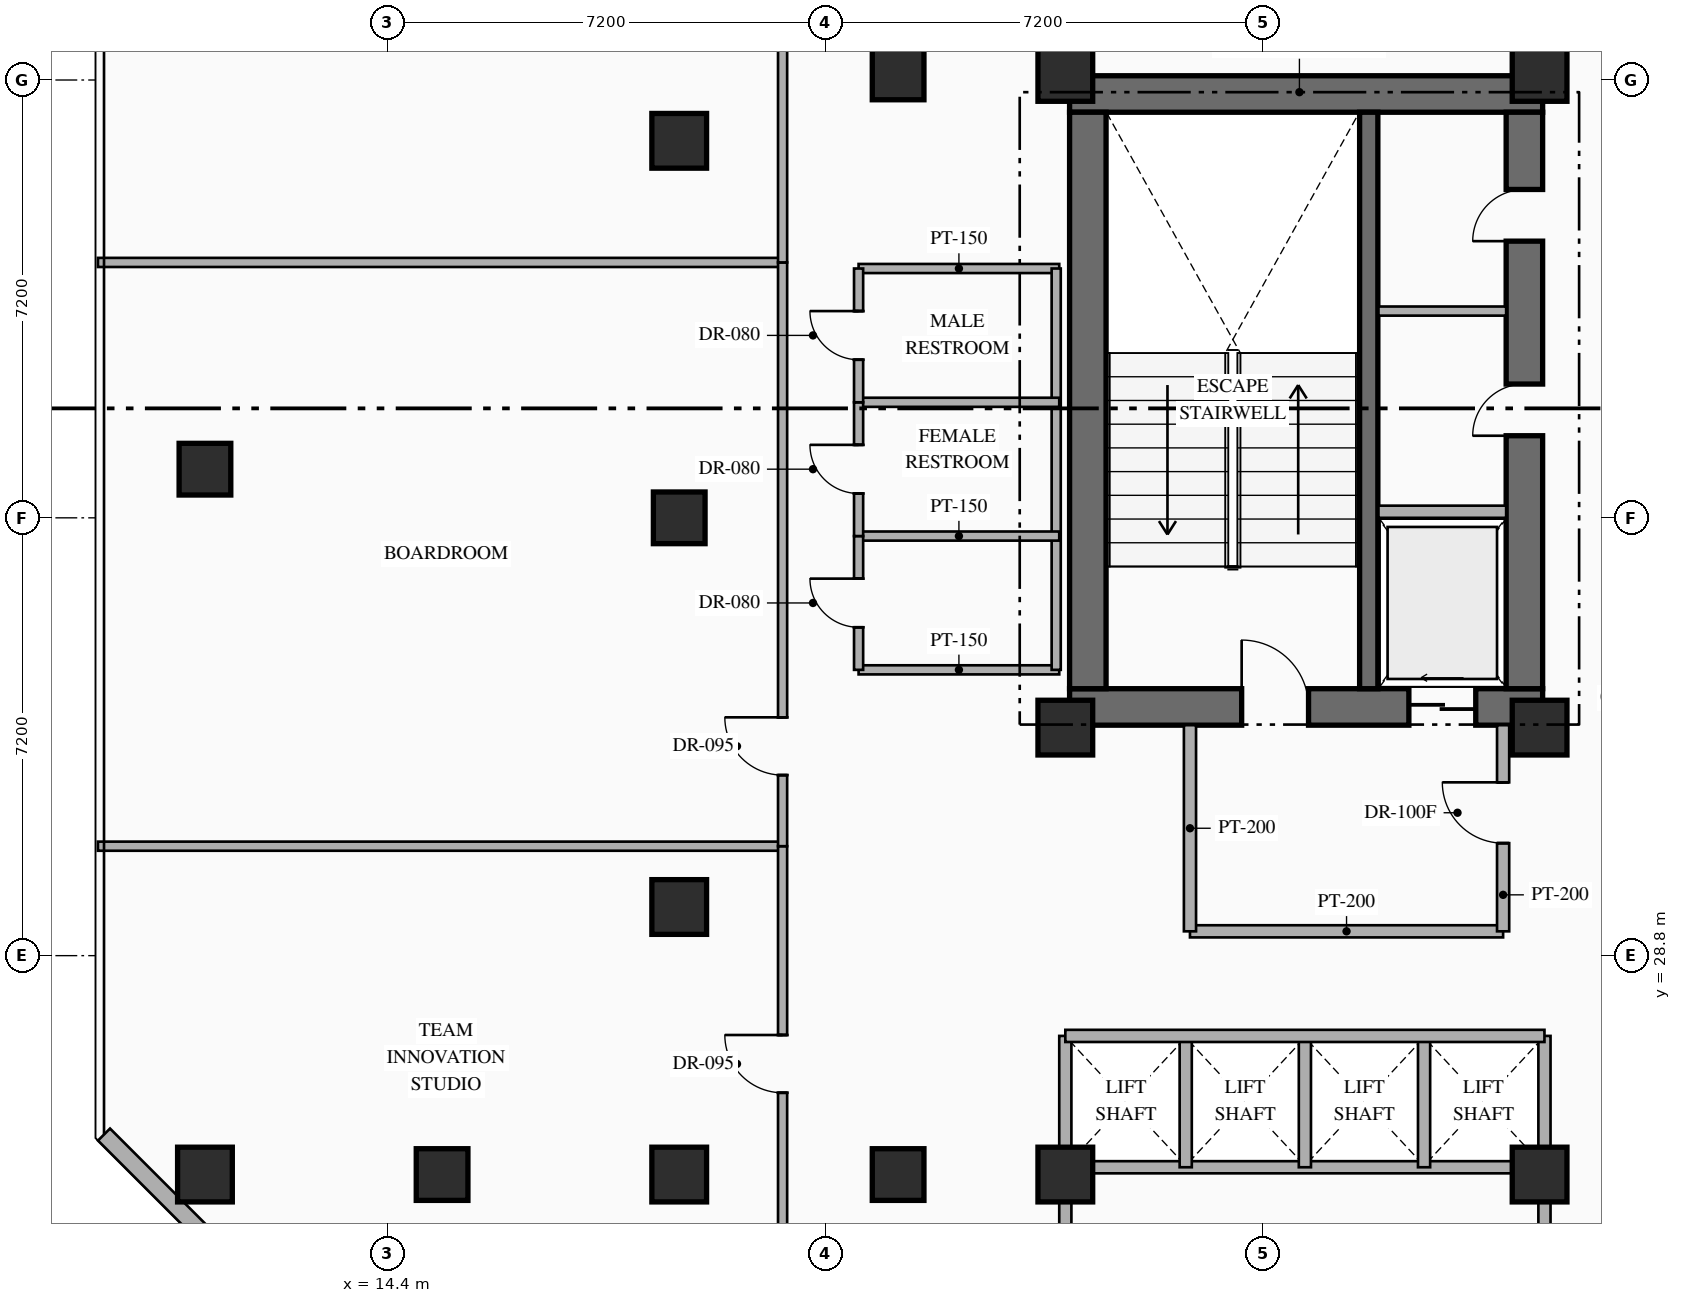
"""IFC4 building model, lengths in metres.
Left out: names, types, materials, properties, quantities, classifications, styles, units other than length and angle.
Written with IfcOpenShell. Run it as: python <this file> out.ifc"""

import sys

from ifc_helpers import new_model, si_unit, direction, frame, frame_2d, origin, origin_2d, place, context, subcontext, project, spatial, rectangle, hollow_rectangle, extrude, element, fill, save


model = new_model("IFC4")
c1 = context("Model", 3, precision=1e-05, world=origin(), true_north=direction((0.0, 1.0)))
c2 = subcontext(c1, "Body", "Model", "MODEL_VIEW")
j1 = project(units=[si_unit("LENGTHUNIT", "METRE"), si_unit("PLANEANGLEUNIT", "RADIAN")], contexts=[c1])
p1 = place(None, origin())
s1 = spatial("IfcSite", under=j1, at=p1, CompositionType="ELEMENT")
p2 = place(p1, origin())
s2 = spatial("IfcBuilding", under=s1, at=p2, CompositionType="ELEMENT")
p3 = place(p2, frame((0.0, 0.0, 101.25)))
s3 = spatial("IfcBuildingStorey", under=s2, at=p3, CompositionType="ELEMENT", Elevation=101.25)
p4 = place(p3, frame((25.62, 32.89, 0.0), z_axis=(0.0, 0.0, 1.0), x_axis=(1.0, 0.0, 0.0)))
e1 = element("IfcWall", 1, at=p4, inside=s3, PredefinedType="SHEAR", context=c2, shape_type="SweptSolid", body=[
    extrude(rectangle(XDim=7.78, YDim=0.6, at=frame_2d((3.89, 0.0))), origin(), (0.0, 0.0, 1.0), 3.6),
])
p5 = place(p4, frame((2.83, 0.0, 0.0)))
e2 = element("IfcOpeningElement", 2, at=p5, cuts=e1, PredefinedType="OPENING", context=c2, shape_type="SweptSolid", body=[
    extrude(rectangle(XDim=1.1, YDim=2.2, at=frame_2d((0.55, 1.1))), frame((0.0, 0.31, 0.0), z_axis=(0.0, -1.0, 0.0), x_axis=(1.0, 0.0, 0.0)), (0.0, 0.0, 1.0), 0.62),
])
p6 = place(p4, frame((5.58, 0.0, 0.0)))
e3 = element("IfcOpeningElement", 3, at=p6, cuts=e1, PredefinedType="OPENING", context=c2, shape_type="SweptSolid", body=[
    extrude(rectangle(XDim=1.1, YDim=2.15, at=frame_2d((0.55, 1.075))), frame((0.0, 0.31, 0.0), z_axis=(0.0, -1.0, 0.0), x_axis=(1.0, 0.0, 0.0)), (0.0, 0.0, 1.0), 0.62),
])
p7 = place(p3, frame((25.62, 42.97, 0.0), z_axis=(0.0, 0.0, 1.0), x_axis=(1.0, 0.0, 0.0)))
e4 = element("IfcWall", 4, at=p7, inside=s3, PredefinedType="SHEAR", context=c2, shape_type="SweptSolid", body=[
    extrude(rectangle(XDim=7.78, YDim=0.6, at=frame_2d((3.89, 0.0))), origin(), (0.0, 0.0, 1.0), 3.6),
])
p8 = place(p3, frame((25.92, 33.19, 0.0), z_axis=(0.0, 0.0, 1.0), x_axis=(0.0, 1.0, 0.0)))
e5 = element("IfcWall", 5, at=p8, inside=s3, PredefinedType="SHEAR", context=c2, shape_type="SweptSolid", body=[
    extrude(rectangle(XDim=9.48, YDim=0.6, at=frame_2d((4.74, 0.0))), origin(), (0.0, 0.0, 1.0), 3.6),
])
p9 = place(p3, frame((33.1, 33.19, 0.0), z_axis=(0.0, 0.0, 1.0), x_axis=(0.0, 1.0, 0.0)))
e6 = element("IfcWall", 6, at=p9, inside=s3, PredefinedType="SHEAR", context=c2, shape_type="SweptSolid", body=[
    extrude(rectangle(XDim=9.48, YDim=0.6, at=frame_2d((4.74, 0.0))), origin(), (0.0, 0.0, 1.0), 3.6),
])
p10 = place(p9, frame((4.16, 0.0, 0.0)))
e7 = element("IfcOpeningElement", 7, at=p10, cuts=e6, PredefinedType="OPENING", context=c2, shape_type="SweptSolid", body=[
    extrude(rectangle(XDim=0.85, YDim=2.08, at=frame_2d((0.425, 1.04))), frame((0.0, 0.31, 0.0), z_axis=(0.0, -1.0, 0.0), x_axis=(1.0, 0.0, 0.0)), (0.0, 0.0, 1.0), 0.62),
])
p11 = place(p9, frame((7.36, 0.0, 0.0)))
e8 = element("IfcOpeningElement", 8, at=p11, cuts=e6, PredefinedType="OPENING", context=c2, shape_type="SweptSolid", body=[
    extrude(rectangle(XDim=0.85, YDim=2.08, at=frame_2d((0.425, 1.04))), frame((0.0, 0.31, 0.0), z_axis=(0.0, -1.0, 0.0), x_axis=(1.0, 0.0, 0.0)), (0.0, 0.0, 1.0), 0.62),
])
p12 = place(p3, frame((30.54, 33.19, 0.0), z_axis=(0.0, 0.0, 1.0), x_axis=(0.0, 1.0, 0.0)))
e9 = element("IfcWall", 9, at=p12, inside=s3, PredefinedType="SHEAR", context=c2, shape_type="SweptSolid", body=[
    extrude(rectangle(XDim=9.48, YDim=0.3, at=frame_2d((4.74, 0.0))), origin(), (0.0, 0.0, 1.0), 3.6),
])
for number, where, z_axis, x_axis in (
    (10, (25.55, 32.55, 0.0), (0.0, 0.0, 1.0), (1.0, 0.0, 0.0)),
    (11, (33.35, 32.55, 0.0), (0.0, 0.0, 1.0), (1.0, 0.0, 0.0)),
    (12, (25.55, 43.3, 0.0), (0.0, 0.0, 1.0), (1.0, 0.0, 0.0)),
    (13, (33.35, 43.3, 0.0), (0.0, 0.0, 1.0), (1.0, 0.0, 0.0)),
):
    element("IfcColumn", number, at=place(p3, frame(where, z_axis=z_axis, x_axis=x_axis)), inside=s3, PredefinedType="COLUMN", context=c2, shape_type="SweptSolid", body=[
        extrude(rectangle(XDim=0.9, YDim=0.9, at=origin_2d()), origin(), (0.0, 0.0, 1.0), 3.6),
    ])
for number, where, z_axis, x_axis in (
    (14, (25.55, 25.2, 0.0), (0.0, 0.0, 1.0), (1.0, 0.0, 0.0)),
    (15, (33.35, 25.2, 0.0), (0.0, 0.0, 1.0), (1.0, 0.0, 0.0)),
    (16, (11.4, 25.2, 0.0), (0.0, 0.0, 1.0), (1.0, 0.0, 0.0)),
    (17, (19.2, 25.2, 0.0), (0.0, 0.0, 1.0), (1.0, 0.0, 0.0)),
    (18, (19.2, 29.6, 0.0), (0.0, 0.0, 1.0), (1.0, 0.0, 0.0)),
    (19, (19.2, 42.2, 0.0), (0.0, 0.0, 1.0), (1.0, 0.0, 0.0)),
):
    element("IfcColumn", number, at=place(p3, frame(where, z_axis=z_axis, x_axis=x_axis)), inside=s3, PredefinedType="COLUMN", context=c2, shape_type="SweptSolid", body=[
        extrude(hollow_rectangle(XDim=0.9, YDim=0.9, WallThickness=0.036, at=origin_2d()), origin(), (0.0, 0.0, 1.0), 3.6),
    ])
for number, where, z_axis, x_axis in (
    (20, (22.8, 25.2, 0.0), (0.0, 0.0, 1.0), (1.0, 0.0, 0.0)),
    (21, (22.8, 43.3, 0.0), (0.0, 0.0, 1.0), (1.0, 0.0, 0.0)),
    (22, (11.4, 36.8, 0.0), (0.0, 0.0, 1.0), (1.0, 0.0, 0.0)),
    (23, (19.2, 36.0, 0.0), (0.0, 0.0, 1.0), (1.0, 0.0, 0.0)),
    (24, (15.3, 25.2, 0.0), (0.0, 0.0, 1.0), (1.0, 0.0, 0.0)),
):
    element("IfcColumn", number, at=place(p3, frame(where, z_axis=z_axis, x_axis=x_axis)), inside=s3, PredefinedType="COLUMN", context=c2, shape_type="SweptSolid", body=[
        extrude(hollow_rectangle(XDim=0.85, YDim=0.85, WallThickness=0.032, at=origin_2d()), origin(), (0.0, 0.0, 1.0), 3.6),
    ])
p13 = place(p3, frame((12.058, 23.54, 0.0), z_axis=(0.0, 0.0, 1.0), x_axis=(-0.707144017911, 0.707069542501, 0.0)))
e25 = element("IfcWall", 25, at=p13, inside=s3, PredefinedType="STANDARD", context=c2, shape_type="SweptSolid", body=[
    extrude(rectangle(XDim=3.278, YDim=0.28, at=frame_2d((1.639, 0.0))), origin(), (0.0, 0.0, 1.0), 3.35),
])
p14 = place(p3, frame((30.7, 36.1, 0.0), z_axis=(0.0, 0.0, 1.0), x_axis=(1.0, 0.0, 0.0)))
e26 = element("IfcWall", 26, at=p14, inside=s3, PredefinedType="STANDARD", context=c2, shape_type="SweptSolid", body=[
    extrude(rectangle(XDim=2.1, YDim=0.2, at=frame_2d((1.05, 0.0))), origin(), (0.0, 0.0, 1.0), 3.35),
])
p15 = place(p3, frame((30.7, 39.4, 0.0), z_axis=(0.0, 0.0, 1.0), x_axis=(1.0, 0.0, 0.0)))
e27 = element("IfcWall", 27, at=p15, inside=s3, PredefinedType="PARTITIONING", context=c2, shape_type="SweptSolid", body=[
    extrude(rectangle(XDim=2.1, YDim=0.15, at=frame_2d((1.05, 0.0))), origin(), (0.0, 0.0, 1.0), 3.35),
])
p16 = place(p3, frame((27.6, 29.2, 0.0), z_axis=(0.0, 0.0, 1.0), x_axis=(1.0, 0.0, 0.0)))
e28 = element("IfcWall", 28, at=p16, inside=s3, PredefinedType="STANDARD", context=c2, shape_type="SweptSolid", body=[
    extrude(rectangle(XDim=5.15, YDim=0.2, at=frame_2d((2.575, 0.0))), origin(), (0.0, 0.0, 1.0), 3.35),
])
p17 = place(p3, frame((27.6, 29.2, 0.0), z_axis=(0.0, 0.0, 1.0), x_axis=(0.0, 1.0, 0.0)))
e29 = element("IfcWall", 29, at=p17, inside=s3, PredefinedType="STANDARD", context=c2, shape_type="SweptSolid", body=[
    extrude(rectangle(XDim=3.39, YDim=0.2, at=frame_2d((1.695, 0.0))), origin(), (0.0, 0.0, 1.0), 3.35),
])
p18 = place(p3, frame((32.75, 29.2, 0.0), z_axis=(0.0, 0.0, 1.0), x_axis=(0.0, 1.0, 0.0)))
e30 = element("IfcWall", 30, at=p18, inside=s3, PredefinedType="STANDARD", context=c2, shape_type="SweptSolid", body=[
    extrude(rectangle(XDim=3.39, YDim=0.2, at=frame_2d((1.695, 0.0))), origin(), (0.0, 0.0, 1.0), 3.35),
])
p19 = place(p18, frame((1.45, 0.0, 0.0)))
e31 = element("IfcOpeningElement", 31, at=p19, cuts=e30, PredefinedType="OPENING", context=c2, shape_type="SweptSolid", body=[
    extrude(rectangle(XDim=1.0, YDim=2.2, at=frame_2d((0.5, 1.1))), frame((0.0, 0.11, 0.0), z_axis=(0.0, -1.0, 0.0), x_axis=(1.0, 0.0, 0.0)), (0.0, 0.0, 1.0), 0.22),
])
for number, where, z_axis, x_axis in (
    (32, (25.55, 23.4, 0.0), (0.0, 0.0, 1.0), (0.0, 1.0, 0.0)),
    (33, (33.43, 23.4, 0.0), (0.0, 0.0, 1.0), (0.0, 1.0, 0.0)),
):
    element("IfcWall", number, at=place(p3, frame(where, z_axis=z_axis, x_axis=x_axis)), inside=s3, PredefinedType="STANDARD", context=c2, shape_type="SweptSolid", body=[
        extrude(rectangle(XDim=4.08, YDim=0.2, at=frame_2d((2.04, 0.0))), origin(), (0.0, 0.0, 1.0), 2.695),
    ])
p20 = place(p3, frame((25.55, 25.32, 0.0), z_axis=(0.0, 0.0, 1.0), x_axis=(1.0, 0.0, 0.0)))
e34 = element("IfcWall", 34, at=p20, inside=s3, PredefinedType="STANDARD", context=c2, shape_type="SweptSolid", body=[
    extrude(rectangle(XDim=7.88, YDim=0.2, at=frame_2d((3.94, 0.0))), origin(), (0.0, 0.0, 1.0), 2.745),
])
for number, where, z_axis, x_axis in (
    (35, (27.53, 25.32, 0.0), (0.0, 0.0, 1.0), (0.0, 1.0, 0.0)),
    (36, (29.49, 25.32, 0.0), (0.0, 0.0, 1.0), (0.0, 1.0, 0.0)),
    (37, (31.45, 25.32, 0.0), (0.0, 0.0, 1.0), (0.0, 1.0, 0.0)),
):
    element("IfcWall", number, at=place(p3, frame(where, z_axis=z_axis, x_axis=x_axis)), inside=s3, PredefinedType="STANDARD", context=c2, shape_type="SweptSolid", body=[
        extrude(rectangle(XDim=2.16, YDim=0.2, at=frame_2d((1.08, 0.0))), origin(), (0.0, 0.0, 1.0), 3.35),
    ])
p21 = place(p3, frame((25.55, 27.48, 0.0), z_axis=(0.0, 0.0, 1.0), x_axis=(1.0, 0.0, 0.0)))
e38 = element("IfcWall", 38, at=p21, inside=s3, PredefinedType="STANDARD", context=c2, shape_type="SweptSolid", body=[
    extrude(rectangle(XDim=7.88, YDim=0.2, at=frame_2d((3.94, 0.0))), origin(), (0.0, 0.0, 1.0), 3.35),
])
for number, where, z_axis, x_axis in (
    (39, (22.15, 33.5, 0.0), (0.0, 0.0, 1.0), (1.0, 0.0, 0.0)),
    (40, (22.15, 40.1, 0.0), (0.0, 0.0, 1.0), (1.0, 0.0, 0.0)),
):
    element("IfcWall", number, at=place(p3, frame(where, z_axis=z_axis, x_axis=x_axis)), inside=s3, PredefinedType="PARTITIONING", context=c2, shape_type="SweptSolid", body=[
        extrude(rectangle(XDim=3.3, YDim=0.15, at=frame_2d((1.65, 0.0))), origin(), (0.0, 0.0, 1.0), 3.35),
    ])
p22 = place(p3, frame((25.4, 33.5, 0.0), z_axis=(0.0, 0.0, 1.0), x_axis=(0.0, 1.0, 0.0)))
e41 = element("IfcWall", 41, at=p22, inside=s3, PredefinedType="PARTITIONING", context=c2, shape_type="SweptSolid", body=[
    extrude(rectangle(XDim=6.6, YDim=0.15, at=frame_2d((3.3, 0.0))), origin(), (0.0, 0.0, 1.0), 3.35),
])
for number, where, z_axis, x_axis in (
    (42, (22.15, 35.7, 0.0), (0.0, 0.0, 1.0), (1.0, 0.0, 0.0)),
    (43, (22.15, 37.9, 0.0), (0.0, 0.0, 1.0), (1.0, 0.0, 0.0)),
):
    element("IfcWall", number, at=place(p3, frame(where, z_axis=z_axis, x_axis=x_axis)), inside=s3, PredefinedType="PARTITIONING", context=c2, shape_type="SweptSolid", body=[
        extrude(rectangle(XDim=3.3, YDim=0.15, at=frame_2d((1.65, 0.0))), origin(), (0.0, 0.0, 1.0), 3.35),
    ])
p23 = place(p3, frame((22.15, 33.5, 0.0), z_axis=(0.0, 0.0, 1.0), x_axis=(0.0, 1.0, 0.0)))
e44 = element("IfcWall", 44, at=p23, inside=s3, PredefinedType="PARTITIONING", context=c2, shape_type="SweptSolid", body=[
    extrude(rectangle(XDim=2.2, YDim=0.15, at=frame_2d((1.1, 0.0))), origin(), (0.0, 0.0, 1.0), 3.35),
])
p24 = place(p23, frame((0.7, 0.0, 0.0)))
e45 = element("IfcOpeningElement", 45, at=p24, cuts=e44, PredefinedType="OPENING", context=c2, shape_type="SweptSolid", body=[
    extrude(rectangle(XDim=0.8, YDim=2.06, at=frame_2d((0.4, 1.03))), frame((0.0, 0.085, 0.0), z_axis=(0.0, -1.0, 0.0), x_axis=(1.0, 0.0, 0.0)), (0.0, 0.0, 1.0), 0.17),
])
p25 = place(p3, frame((22.15, 35.7, 0.0), z_axis=(0.0, 0.0, 1.0), x_axis=(0.0, 1.0, 0.0)))
e46 = element("IfcWall", 46, at=p25, inside=s3, PredefinedType="PARTITIONING", context=c2, shape_type="SweptSolid", body=[
    extrude(rectangle(XDim=2.2, YDim=0.15, at=frame_2d((1.1, 0.0))), origin(), (0.0, 0.0, 1.0), 3.35),
])
p26 = place(p25, frame((0.7, 0.0, 0.0)))
e47 = element("IfcOpeningElement", 47, at=p26, cuts=e46, PredefinedType="OPENING", context=c2, shape_type="SweptSolid", body=[
    extrude(rectangle(XDim=0.8, YDim=2.06, at=frame_2d((0.4, 1.03))), frame((0.0, 0.085, 0.0), z_axis=(0.0, -1.0, 0.0), x_axis=(1.0, 0.0, 0.0)), (0.0, 0.0, 1.0), 0.17),
])
p27 = place(p3, frame((22.15, 37.9, 0.0), z_axis=(0.0, 0.0, 1.0), x_axis=(0.0, 1.0, 0.0)))
e48 = element("IfcWall", 48, at=p27, inside=s3, PredefinedType="PARTITIONING", context=c2, shape_type="SweptSolid", body=[
    extrude(rectangle(XDim=2.2, YDim=0.15, at=frame_2d((1.1, 0.0))), origin(), (0.0, 0.0, 1.0), 3.35),
])
p28 = place(p27, frame((0.7, 0.0, 0.0)))
e49 = element("IfcOpeningElement", 49, at=p28, cuts=e48, PredefinedType="OPENING", context=c2, shape_type="SweptSolid", body=[
    extrude(rectangle(XDim=0.8, YDim=2.06, at=frame_2d((0.4, 1.03))), frame((0.0, 0.085, 0.0), z_axis=(0.0, -1.0, 0.0), x_axis=(1.0, 0.0, 0.0)), (0.0, 0.0, 1.0), 0.17),
])
p29 = place(p3, frame((9.64, 30.6, 0.0), z_axis=(0.0, 0.0, 1.0), x_axis=(1.0, 0.0, 0.0)))
e50 = element("IfcWall", 50, at=p29, inside=s3, PredefinedType="PARTITIONING", context=c2, shape_type="SweptSolid", body=[
    extrude(rectangle(XDim=11.26, YDim=0.15, at=frame_2d((5.63, 0.0))), origin(), (0.0, 0.0, 1.0), 3.35),
])
p30 = place(p3, frame((20.9, 23.44, 0.0), z_axis=(0.0, 0.0, 1.0), x_axis=(0.0, 1.0, 0.0)))
e51 = element("IfcWall", 51, at=p30, inside=s3, PredefinedType="PARTITIONING", context=c2, shape_type="SweptSolid", body=[
    extrude(rectangle(XDim=7.16, YDim=0.15, at=frame_2d((3.58, 0.0))), origin(), (0.0, 0.0, 1.0), 3.35),
])
p31 = place(p30, frame((3.105, 0.0, 0.0)))
e52 = element("IfcOpeningElement", 52, at=p31, cuts=e51, PredefinedType="OPENING", context=c2, shape_type="SweptSolid", body=[
    extrude(rectangle(XDim=0.95, YDim=2.15, at=frame_2d((0.475, 1.075))), frame((0.0, 0.085, 0.0), z_axis=(0.0, -1.0, 0.0), x_axis=(1.0, 0.0, 0.0)), (0.0, 0.0, 1.0), 0.17),
])
p32 = place(p3, frame((9.64, 40.2, 0.0), z_axis=(0.0, 0.0, 1.0), x_axis=(1.0, 0.0, 0.0)))
e53 = element("IfcWall", 53, at=p32, inside=s3, PredefinedType="PARTITIONING", context=c2, shape_type="SweptSolid", body=[
    extrude(rectangle(XDim=11.26, YDim=0.15, at=frame_2d((5.63, 0.0))), origin(), (0.0, 0.0, 1.0), 3.35),
])
p33 = place(p3, frame((20.9, 30.6, 0.0), z_axis=(0.0, 0.0, 1.0), x_axis=(0.0, 1.0, 0.0)))
e54 = element("IfcWall", 54, at=p33, inside=s3, PredefinedType="PARTITIONING", context=c2, shape_type="SweptSolid", body=[
    extrude(rectangle(XDim=9.6, YDim=0.15, at=frame_2d((4.8, 0.0))), origin(), (0.0, 0.0, 1.0), 3.35),
])
p34 = place(p33, frame((1.169, 0.0, 0.0)))
e55 = element("IfcOpeningElement", 55, at=p34, cuts=e54, PredefinedType="OPENING", context=c2, shape_type="SweptSolid", body=[
    extrude(rectangle(XDim=0.95, YDim=2.15, at=frame_2d((0.475, 1.075))), frame((0.0, 0.085, 0.0), z_axis=(0.0, -1.0, 0.0), x_axis=(1.0, 0.0, 0.0)), (0.0, 0.0, 1.0), 0.17),
])
p35 = place(p3, frame((20.9, 40.2, 0.0), z_axis=(0.0, 0.0, 1.0), x_axis=(0.0, 1.0, 0.0)))
e56 = element("IfcWall", 56, at=p35, inside=s3, PredefinedType="PARTITIONING", context=c2, shape_type="SweptSolid", body=[
    extrude(rectangle(XDim=10.16, YDim=0.15, at=frame_2d((5.08, 0.0))), origin(), (0.0, 0.0, 1.0), 3.35),
])
p36 = place(p35, frame((3.76, 0.0, 0.0)))
e57 = element("IfcOpeningElement", 57, at=p36, cuts=e56, PredefinedType="OPENING", context=c2, shape_type="SweptSolid", body=[
    extrude(rectangle(XDim=0.95, YDim=2.15, at=frame_2d((0.475, 1.075))), frame((0.0, 0.085, 0.0), z_axis=(0.0, -1.0, 0.0), x_axis=(1.0, 0.0, 0.0)), (0.0, 0.0, 1.0), 0.17),
])
p37 = place(p5, origin())
e58 = element("IfcDoor", 58, at=p37, inside=s3, OperationType="SINGLE_SWING_LEFT", PredefinedType="DOOR", context=c2, shape_type="SweptSolid", body=[
    extrude(rectangle(XDim=1.1, YDim=2.2, at=frame_2d((0.55, 1.1))), frame((0.0, 0.025, 0.0), z_axis=(0.0, -1.0, 0.0), x_axis=(1.0, 0.0, 0.0)), (0.0, 0.0, 1.0), 0.05),
])
fill(e2, e58)
p38 = place(p6, origin())
e59 = element("IfcDoor", 59, at=p38, inside=s3, OperationType="SLIDING_TO_LEFT", PredefinedType="USERDEFINED", context=c2, shape_type="SweptSolid", body=[
    extrude(rectangle(XDim=1.1, YDim=2.15, at=frame_2d((0.55, 1.075))), frame((0.0, 0.025, 0.0), z_axis=(0.0, -1.0, 0.0), x_axis=(1.0, 0.0, 0.0)), (0.0, 0.0, 1.0), 0.05),
])
fill(e3, e59)
p39 = place(p10, origin())
e60 = element("IfcDoor", 60, at=p39, inside=s3, OperationType="SINGLE_SWING_LEFT", PredefinedType="DOOR", context=c2, shape_type="SweptSolid", body=[
    extrude(rectangle(XDim=0.85, YDim=2.08, at=frame_2d((0.425, 1.04))), frame((0.0, 0.025, 0.0), z_axis=(0.0, -1.0, 0.0), x_axis=(1.0, 0.0, 0.0)), (0.0, 0.0, 1.0), 0.05),
])
fill(e7, e60)
p40 = place(p11, origin())
e61 = element("IfcDoor", 61, at=p40, inside=s3, OperationType="SINGLE_SWING_LEFT", PredefinedType="DOOR", context=c2, shape_type="SweptSolid", body=[
    extrude(rectangle(XDim=0.85, YDim=2.08, at=frame_2d((0.425, 1.04))), frame((0.0, 0.025, 0.0), z_axis=(0.0, -1.0, 0.0), x_axis=(1.0, 0.0, 0.0)), (0.0, 0.0, 1.0), 0.05),
])
fill(e8, e61)
p41 = place(p19, origin())
e62 = element("IfcDoor", 62, at=p41, inside=s3, OperationType="SINGLE_SWING_RIGHT", PredefinedType="DOOR", context=c2, shape_type="SweptSolid", body=[
    extrude(rectangle(XDim=1.0, YDim=2.2, at=frame_2d((0.5, 1.1))), frame((0.0, 0.025, 0.0), z_axis=(0.0, -1.0, 0.0), x_axis=(1.0, 0.0, 0.0)), (0.0, 0.0, 1.0), 0.05),
])
fill(e31, e62)
p42 = place(p24, origin())
e63 = element("IfcDoor", 63, at=p42, inside=s3, OperationType="SINGLE_SWING_RIGHT", PredefinedType="DOOR", context=c2, shape_type="SweptSolid", body=[
    extrude(rectangle(XDim=0.8, YDim=2.06, at=frame_2d((0.4, 1.03))), frame((0.0, 0.025, 0.0), z_axis=(0.0, -1.0, 0.0), x_axis=(1.0, 0.0, 0.0)), (0.0, 0.0, 1.0), 0.05),
])
fill(e45, e63)
p43 = place(p26, origin())
e64 = element("IfcDoor", 64, at=p43, inside=s3, OperationType="SINGLE_SWING_RIGHT", PredefinedType="DOOR", context=c2, shape_type="SweptSolid", body=[
    extrude(rectangle(XDim=0.8, YDim=2.06, at=frame_2d((0.4, 1.03))), frame((0.0, 0.025, 0.0), z_axis=(0.0, -1.0, 0.0), x_axis=(1.0, 0.0, 0.0)), (0.0, 0.0, 1.0), 0.05),
])
fill(e47, e64)
p44 = place(p28, origin())
e65 = element("IfcDoor", 65, at=p44, inside=s3, OperationType="SINGLE_SWING_RIGHT", PredefinedType="DOOR", context=c2, shape_type="SweptSolid", body=[
    extrude(rectangle(XDim=0.8, YDim=2.06, at=frame_2d((0.4, 1.03))), frame((0.0, 0.025, 0.0), z_axis=(0.0, -1.0, 0.0), x_axis=(1.0, 0.0, 0.0)), (0.0, 0.0, 1.0), 0.05),
])
fill(e49, e65)
p45 = place(p31, origin())
e66 = element("IfcDoor", 66, at=p45, inside=s3, OperationType="SINGLE_SWING_RIGHT", PredefinedType="DOOR", context=c2, shape_type="SweptSolid", body=[
    extrude(rectangle(XDim=0.95, YDim=2.15, at=frame_2d((0.475, 1.075))), frame((0.0, 0.025, 0.0), z_axis=(0.0, -1.0, 0.0), x_axis=(1.0, 0.0, 0.0)), (0.0, 0.0, 1.0), 0.05),
])
fill(e52, e66)
p46 = place(p34, origin())
e67 = element("IfcDoor", 67, at=p46, inside=s3, OperationType="SINGLE_SWING_RIGHT", PredefinedType="DOOR", context=c2, shape_type="SweptSolid", body=[
    extrude(rectangle(XDim=0.95, YDim=2.15, at=frame_2d((0.475, 1.075))), frame((0.0, 0.025, 0.0), z_axis=(0.0, -1.0, 0.0), x_axis=(1.0, 0.0, 0.0)), (0.0, 0.0, 1.0), 0.05),
])
fill(e55, e67)
save(model, sys.argv[1])
